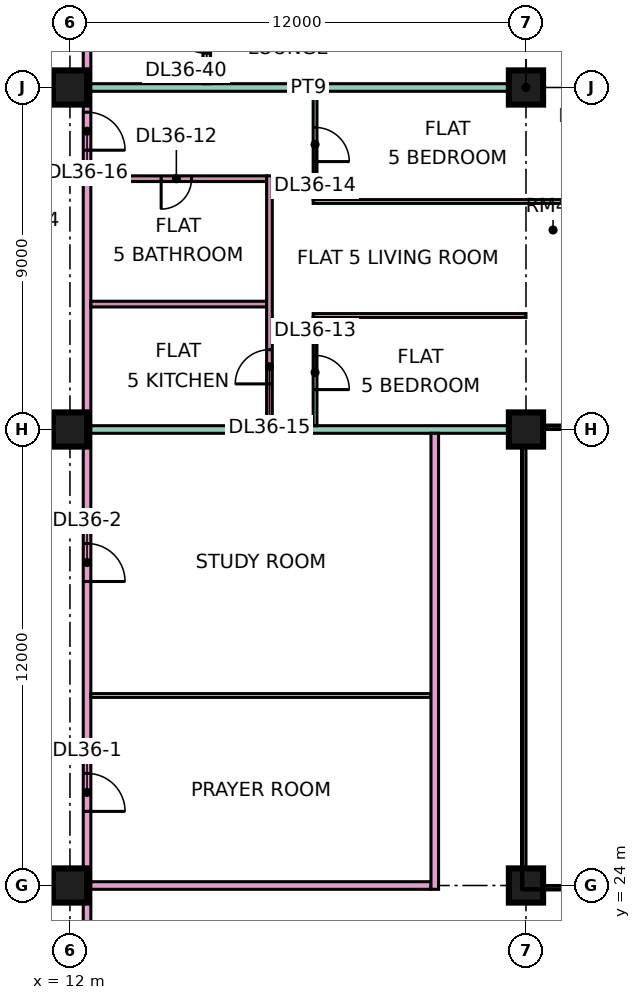
"""IFC4 building model, lengths in metres.
Left out: names, types, materials, properties, quantities, classifications, styles, units other than length and angle.
Written with IfcOpenShell. Run it as: python <this file> out.ifc"""

import sys

from ifc_helpers import new_model, si_unit, direction, frame, frame_2d, origin, origin_2d, place, context, subcontext, project, spatial, rectangle, extrude, element, fill, save


model = new_model("IFC4")
c1 = context("Model", 3, precision=1e-05, world=origin(), true_north=direction((0.0, 1.0)))
c2 = subcontext(c1, "Body", "Model", "MODEL_VIEW")
j1 = project(units=[si_unit("LENGTHUNIT", "METRE"), si_unit("PLANEANGLEUNIT", "RADIAN")], contexts=[c1])
p1 = place(None, origin())
s1 = spatial("IfcSite", under=j1, at=p1, CompositionType="ELEMENT")
p2 = place(p1, origin())
s2 = spatial("IfcBuilding", under=s1, at=p2, CompositionType="ELEMENT")
p3 = place(p2, frame((0.0, 0.0, 161.15)))
s3 = spatial("IfcBuildingStorey", under=s2, at=p3, CompositionType="ELEMENT", Elevation=161.15)
for number, where, z_axis, x_axis in (
    (1, (12.0, 24.0, 0.0), (0.0, 0.0, 1.0), (1.0, 0.0, 0.0)),
    (2, (12.0, 36.0, 0.0), (0.0, 0.0, 1.0), (1.0, 0.0, 0.0)),
    (3, (12.0, 45.0, 0.0), (0.0, 0.0, 1.0), (1.0, 0.0, 0.0)),
    (4, (24.0, 24.0, 0.0), (0.0, 0.0, 1.0), (1.0, 0.0, 0.0)),
    (5, (24.0, 36.0, 0.0), (0.0, 0.0, 1.0), (1.0, 0.0, 0.0)),
    (6, (24.0, 45.0, 0.0), (0.0, 0.0, 1.0), (1.0, 0.0, 0.0)),
):
    element("IfcColumn", number, at=place(p3, frame(where, z_axis=z_axis, x_axis=x_axis)), inside=s3, PredefinedType="COLUMN", context=c2, shape_type="SweptSolid", body=[
        extrude(rectangle(XDim=0.9, YDim=0.9, at=origin_2d()), origin(), (0.0, 0.0, 1.0), 3.75),
    ])
p4 = place(p3, frame((12.45, 20.0, 0.0), z_axis=(0.0, 0.0, 1.0), x_axis=(0.0, 1.0, 0.0)))
e7 = element("IfcWall", 7, at=p4, inside=s3, PredefinedType="PARTITIONING", context=c2, shape_type="SweptSolid", body=[
    extrude(rectangle(XDim=43.0, YDim=0.2, at=frame_2d((21.5, 0.0))), origin(), (0.0, 0.0, 1.0), 3.35),
])
p5 = place(p4, frame((5.95, 0.0, 0.0)))
e8 = element("IfcOpeningElement", 8, at=p5, cuts=e7, PredefinedType="OPENING", context=c2, shape_type="SweptSolid", body=[
    extrude(rectangle(XDim=1.0, YDim=2.1, at=frame_2d((0.5, 1.05))), frame((0.0, 0.11, 0.0), z_axis=(0.0, -1.0, 0.0), x_axis=(1.0, 0.0, 0.0)), (0.0, 0.0, 1.0), 0.22),
])
p6 = place(p4, frame((12.0, 0.0, 0.0)))
e9 = element("IfcOpeningElement", 9, at=p6, cuts=e7, PredefinedType="OPENING", context=c2, shape_type="SweptSolid", body=[
    extrude(rectangle(XDim=1.0, YDim=2.1, at=frame_2d((0.5, 1.05))), frame((0.0, 0.11, 0.0), z_axis=(0.0, -1.0, 0.0), x_axis=(1.0, 0.0, 0.0)), (0.0, 0.0, 1.0), 0.22),
])
p7 = place(p4, frame((23.35, 0.0, 0.0)))
e10 = element("IfcOpeningElement", 10, at=p7, cuts=e7, PredefinedType="OPENING", context=c2, shape_type="SweptSolid", body=[
    extrude(rectangle(XDim=1.0, YDim=2.1, at=frame_2d((0.5, 1.05))), frame((0.0, 0.11, 0.0), z_axis=(0.0, -1.0, 0.0), x_axis=(1.0, 0.0, 0.0)), (0.0, 0.0, 1.0), 0.22),
])
p8 = place(p4, frame((35.2, 0.0, 0.0)))
e11 = element("IfcOpeningElement", 11, at=p8, cuts=e7, PredefinedType="OPENING", context=c2, shape_type="SweptSolid", body=[
    extrude(rectangle(XDim=1.0, YDim=2.1, at=frame_2d((0.5, 1.05))), frame((0.0, 0.11, 0.0), z_axis=(0.0, -1.0, 0.0), x_axis=(1.0, 0.0, 0.0)), (0.0, 0.0, 1.0), 0.22),
])
p9 = place(p4, frame((1.15, 0.0, 0.0)))
e12 = element("IfcOpeningElement", 12, at=p9, cuts=e7, PredefinedType="OPENING", context=c2, shape_type="SweptSolid", body=[
    extrude(rectangle(XDim=1.8, YDim=2.1, at=frame_2d((0.9, 1.05))), frame((0.0, 0.11, 0.0), z_axis=(0.0, -1.0, 0.0), x_axis=(1.0, 0.0, 0.0)), (0.0, 0.0, 1.0), 0.22),
])
p10 = place(p4, frame((28.6, 0.0, 0.0)))
e13 = element("IfcOpeningElement", 13, at=p10, cuts=e7, PredefinedType="OPENING", context=c2, shape_type="SweptSolid", body=[
    extrude(rectangle(XDim=1.8, YDim=2.1, at=frame_2d((0.9, 1.05))), frame((0.0, 0.11, 0.0), z_axis=(0.0, -1.0, 0.0), x_axis=(1.0, 0.0, 0.0)), (0.0, 0.0, 1.0), 0.22),
])
p11 = place(p3, frame((12.55, 24.0, 0.0), z_axis=(0.0, 0.0, 1.0), x_axis=(1.0, 0.0, 0.0)))
e14 = element("IfcWall", 14, at=p11, inside=s3, PredefinedType="PARTITIONING", context=c2, shape_type="SweptSolid", body=[
    extrude(rectangle(XDim=8.95, YDim=0.2, at=frame_2d((4.475, 0.0))), origin(), (0.0, 0.0, 1.0), 3.35),
])
p12 = place(p3, frame((12.55, 29.0, 0.0), z_axis=(0.0, 0.0, 1.0), x_axis=(1.0, 0.0, 0.0)))
e15 = element("IfcWall", 15, at=p12, inside=s3, PredefinedType="PARTITIONING", context=c2, shape_type="SweptSolid", body=[
    extrude(rectangle(XDim=8.95, YDim=0.1, at=frame_2d((4.475, 0.0))), origin(), (0.0, 0.0, 1.0), 3.35),
])
p13 = place(p3, frame((12.55, 36.0, 0.0), z_axis=(0.0, 0.0, 1.0), x_axis=(1.0, 0.0, 0.0)))
e16 = element("IfcWall", 16, at=p13, inside=s3, PredefinedType="PARTITIONING", context=c2, shape_type="SweptSolid", body=[
    extrude(rectangle(XDim=11.45, YDim=0.2, at=frame_2d((5.725, 0.0))), origin(), (0.0, 0.0, 1.0), 3.35),
])
p14 = place(p3, frame((12.55, 39.3, 0.0), z_axis=(0.0, 0.0, 1.0), x_axis=(1.0, 0.0, 0.0)))
e17 = element("IfcWall", 17, at=p14, inside=s3, PredefinedType="PARTITIONING", context=c2, shape_type="SweptSolid", body=[
    extrude(rectangle(XDim=4.625, YDim=0.15, at=frame_2d((2.312, 0.0))), origin(), (0.0, 0.0, 1.0), 3.35),
])
p15 = place(p3, frame((12.55, 42.6, 0.0), z_axis=(0.0, 0.0, 1.0), x_axis=(1.0, 0.0, 0.0)))
e18 = element("IfcWall", 18, at=p15, inside=s3, PredefinedType="PARTITIONING", context=c2, shape_type="SweptSolid", body=[
    extrude(rectangle(XDim=4.625, YDim=0.15, at=frame_2d((2.312, 0.0))), origin(), (0.0, 0.0, 1.0), 3.35),
])
p16 = place(p15, frame((1.85, 0.0, 0.0)))
e19 = element("IfcOpeningElement", 19, at=p16, cuts=e18, PredefinedType="OPENING", context=c2, shape_type="SweptSolid", body=[
    extrude(rectangle(XDim=0.8, YDim=2.1, at=frame_2d((0.4, 1.05))), frame((0.0, 0.085, 0.0), z_axis=(0.0, -1.0, 0.0), x_axis=(1.0, 0.0, 0.0)), (0.0, 0.0, 1.0), 0.17),
])
p17 = place(p3, frame((12.55, 45.0, 0.0), z_axis=(0.0, 0.0, 1.0), x_axis=(1.0, 0.0, 0.0)))
e20 = element("IfcWall", 20, at=p17, inside=s3, PredefinedType="PARTITIONING", context=c2, shape_type="SweptSolid", body=[
    extrude(rectangle(XDim=11.45, YDim=0.2, at=frame_2d((5.725, 0.0))), origin(), (0.0, 0.0, 1.0), 3.35),
])
p18 = place(p3, frame((15.6, 45.1, 0.0), z_axis=(0.0, 0.0, 1.0), x_axis=(0.0, 1.0, 0.0)))
e21 = element("IfcWall", 21, at=p18, inside=s3, PredefinedType="PARTITIONING", context=c2, shape_type="SweptSolid", body=[
    extrude(rectangle(XDim=2.675, YDim=0.2, at=frame_2d((1.337, 0.0))), origin(), (0.0, 0.0, 1.0), 3.35),
])
p19 = place(p18, frame((0.8, 0.0, 0.0)))
e22 = element("IfcOpeningElement", 22, at=p19, cuts=e21, PredefinedType="OPENING", context=c2, shape_type="SweptSolid", body=[
    extrude(rectangle(XDim=1.0, YDim=2.1, at=frame_2d((0.5, 1.05))), frame((0.0, 0.11, 0.0), z_axis=(0.0, -1.0, 0.0), x_axis=(1.0, 0.0, 0.0)), (0.0, 0.0, 1.0), 0.22),
])
p20 = place(p3, frame((17.25, 36.1, 0.0), z_axis=(0.0, 0.0, 1.0), x_axis=(0.0, 1.0, 0.0)))
e23 = element("IfcWall", 23, at=p20, inside=s3, PredefinedType="PARTITIONING", context=c2, shape_type="SweptSolid", body=[
    extrude(rectangle(XDim=6.575, YDim=0.15, at=frame_2d((3.288, 0.0))), origin(), (0.0, 0.0, 1.0), 3.35),
])
p21 = place(p20, frame((1.1, 0.0, 0.0)))
e24 = element("IfcOpeningElement", 24, at=p21, cuts=e23, PredefinedType="OPENING", context=c2, shape_type="SweptSolid", body=[
    extrude(rectangle(XDim=0.9, YDim=2.1, at=frame_2d((0.45, 1.05))), frame((0.0, 0.085, 0.0), z_axis=(0.0, -1.0, 0.0), x_axis=(1.0, 0.0, 0.0)), (0.0, 0.0, 1.0), 0.17),
])
p22 = place(p3, frame((18.4, 39.0, 0.0), z_axis=(0.0, 0.0, 1.0), x_axis=(1.0, 0.0, 0.0)))
e25 = element("IfcWall", 25, at=p22, inside=s3, PredefinedType="PARTITIONING", context=c2, shape_type="SweptSolid", body=[
    extrude(rectangle(XDim=5.6, YDim=0.1, at=frame_2d((2.8, 0.0))), origin(), (0.0, 0.0, 1.0), 3.35),
])
p23 = place(p3, frame((18.4, 42.0, 0.0), z_axis=(0.0, 0.0, 1.0), x_axis=(1.0, 0.0, 0.0)))
e26 = element("IfcWall", 26, at=p23, inside=s3, PredefinedType="PARTITIONING", context=c2, shape_type="SweptSolid", body=[
    extrude(rectangle(XDim=6.95, YDim=0.1, at=frame_2d((3.475, 0.0))), origin(), (0.0, 0.0, 1.0), 3.35),
])
p24 = place(p3, frame((18.45, 36.1, 0.0), z_axis=(0.0, 0.0, 1.0), x_axis=(0.0, 1.0, 0.0)))
e27 = element("IfcWall", 27, at=p24, inside=s3, PredefinedType="PARTITIONING", context=c2, shape_type="SweptSolid", body=[
    extrude(rectangle(XDim=2.85, YDim=0.1, at=frame_2d((1.425, 0.0))), origin(), (0.0, 0.0, 1.0), 3.35),
])
p25 = place(p24, frame((0.95, 0.0, 0.0)))
e28 = element("IfcOpeningElement", 28, at=p25, cuts=e27, PredefinedType="OPENING", context=c2, shape_type="SweptSolid", body=[
    extrude(rectangle(XDim=0.9, YDim=2.1, at=frame_2d((0.45, 1.05))), frame((0.0, 0.06, 0.0), z_axis=(0.0, -1.0, 0.0), x_axis=(1.0, 0.0, 0.0)), (0.0, 0.0, 1.0), 0.12),
])
p26 = place(p3, frame((18.45, 42.05, 0.0), z_axis=(0.0, 0.0, 1.0), x_axis=(0.0, 1.0, 0.0)))
e29 = element("IfcWall", 29, at=p26, inside=s3, PredefinedType="PARTITIONING", context=c2, shape_type="SweptSolid", body=[
    extrude(rectangle(XDim=2.85, YDim=0.1, at=frame_2d((1.425, 0.0))), origin(), (0.0, 0.0, 1.0), 3.35),
])
p27 = place(p26, frame((1.0, 0.0, 0.0)))
e30 = element("IfcOpeningElement", 30, at=p27, cuts=e29, PredefinedType="OPENING", context=c2, shape_type="SweptSolid", body=[
    extrude(rectangle(XDim=0.9, YDim=2.1, at=frame_2d((0.45, 1.05))), frame((0.0, 0.06, 0.0), z_axis=(0.0, -1.0, 0.0), x_axis=(1.0, 0.0, 0.0)), (0.0, 0.0, 1.0), 0.12),
])
p28 = place(p3, frame((21.6, 23.9, 0.0), z_axis=(0.0, 0.0, 1.0), x_axis=(0.0, 1.0, 0.0)))
e31 = element("IfcWall", 31, at=p28, inside=s3, PredefinedType="PARTITIONING", context=c2, shape_type="SweptSolid", body=[
    extrude(rectangle(XDim=12.0, YDim=0.2, at=frame_2d((6.0, 0.0))), origin(), (0.0, 0.0, 1.0), 3.35),
])
p29 = place(p5, frame((1.0, 0.0, 0.0), z_axis=(0.0, 0.0, 1.0), x_axis=(-1.0, 0.0, 0.0)))
e32 = element("IfcDoor", 32, at=p29, inside=s3, OperationType="SINGLE_SWING_LEFT", PredefinedType="DOOR", context=c2, shape_type="SweptSolid", body=[
    extrude(rectangle(XDim=1.0, YDim=2.1, at=frame_2d((0.5, 1.05))), frame((0.0, 0.025, 0.0), z_axis=(0.0, -1.0, 0.0), x_axis=(1.0, 0.0, 0.0)), (0.0, 0.0, 1.0), 0.05),
])
fill(e8, e32)
p30 = place(p6, frame((1.0, 0.0, 0.0), z_axis=(0.0, 0.0, 1.0), x_axis=(-1.0, 0.0, 0.0)))
e33 = element("IfcDoor", 33, at=p30, inside=s3, OperationType="SINGLE_SWING_LEFT", PredefinedType="DOOR", context=c2, shape_type="SweptSolid", body=[
    extrude(rectangle(XDim=1.0, YDim=2.1, at=frame_2d((0.5, 1.05))), frame((0.0, 0.025, 0.0), z_axis=(0.0, -1.0, 0.0), x_axis=(1.0, 0.0, 0.0)), (0.0, 0.0, 1.0), 0.05),
])
fill(e9, e33)
p31 = place(p16, frame((0.8, 0.0, 0.0), z_axis=(0.0, 0.0, 1.0), x_axis=(-1.0, 0.0, 0.0)))
e34 = element("IfcDoor", 34, at=p31, inside=s3, OperationType="SINGLE_SWING_LEFT", PredefinedType="DOOR", context=c2, shape_type="SweptSolid", body=[
    extrude(rectangle(XDim=0.8, YDim=2.1, at=frame_2d((0.4, 1.05))), frame((0.0, 0.025, 0.0), z_axis=(0.0, -1.0, 0.0), x_axis=(1.0, 0.0, 0.0)), (0.0, 0.0, 1.0), 0.05),
])
fill(e19, e34)
p32 = place(p25, frame((0.9, 0.0, 0.0), z_axis=(0.0, 0.0, 1.0), x_axis=(-1.0, 0.0, 0.0)))
e35 = element("IfcDoor", 35, at=p32, inside=s3, OperationType="SINGLE_SWING_LEFT", PredefinedType="DOOR", context=c2, shape_type="SweptSolid", body=[
    extrude(rectangle(XDim=0.9, YDim=2.1, at=frame_2d((0.45, 1.05))), frame((0.0, 0.025, 0.0), z_axis=(0.0, -1.0, 0.0), x_axis=(1.0, 0.0, 0.0)), (0.0, 0.0, 1.0), 0.05),
])
fill(e28, e35)
p33 = place(p27, frame((0.9, 0.0, 0.0), z_axis=(0.0, 0.0, 1.0), x_axis=(-1.0, 0.0, 0.0)))
e36 = element("IfcDoor", 36, at=p33, inside=s3, OperationType="SINGLE_SWING_LEFT", PredefinedType="DOOR", context=c2, shape_type="SweptSolid", body=[
    extrude(rectangle(XDim=0.9, YDim=2.1, at=frame_2d((0.45, 1.05))), frame((0.0, 0.025, 0.0), z_axis=(0.0, -1.0, 0.0), x_axis=(1.0, 0.0, 0.0)), (0.0, 0.0, 1.0), 0.05),
])
fill(e30, e36)
p34 = place(p21, origin())
e37 = element("IfcDoor", 37, at=p34, inside=s3, OperationType="SINGLE_SWING_LEFT", PredefinedType="DOOR", context=c2, shape_type="SweptSolid", body=[
    extrude(rectangle(XDim=0.9, YDim=2.1, at=frame_2d((0.45, 1.05))), frame((0.0, 0.025, 0.0), z_axis=(0.0, -1.0, 0.0), x_axis=(1.0, 0.0, 0.0)), (0.0, 0.0, 1.0), 0.05),
])
fill(e24, e37)
p35 = place(p7, frame((1.0, 0.0, 0.0), z_axis=(0.0, 0.0, 1.0), x_axis=(-1.0, 0.0, 0.0)))
e38 = element("IfcDoor", 38, at=p35, inside=s3, OperationType="SINGLE_SWING_LEFT", PredefinedType="DOOR", context=c2, shape_type="SweptSolid", body=[
    extrude(rectangle(XDim=1.0, YDim=2.1, at=frame_2d((0.5, 1.05))), frame((0.0, 0.025, 0.0), z_axis=(0.0, -1.0, 0.0), x_axis=(1.0, 0.0, 0.0)), (0.0, 0.0, 1.0), 0.05),
])
fill(e10, e38)
p36 = place(p19, frame((1.0, 0.0, 0.0), z_axis=(0.0, 0.0, 1.0), x_axis=(-1.0, 0.0, 0.0)))
e39 = element("IfcDoor", 39, at=p36, inside=s3, OperationType="SINGLE_SWING_RIGHT", PredefinedType="DOOR", context=c2, shape_type="SweptSolid", body=[
    extrude(rectangle(XDim=1.0, YDim=2.1, at=frame_2d((0.5, 1.05))), frame((0.0, 0.025, 0.0), z_axis=(0.0, -1.0, 0.0), x_axis=(1.0, 0.0, 0.0)), (0.0, 0.0, 1.0), 0.05),
])
fill(e22, e39)
save(model, sys.argv[1])
